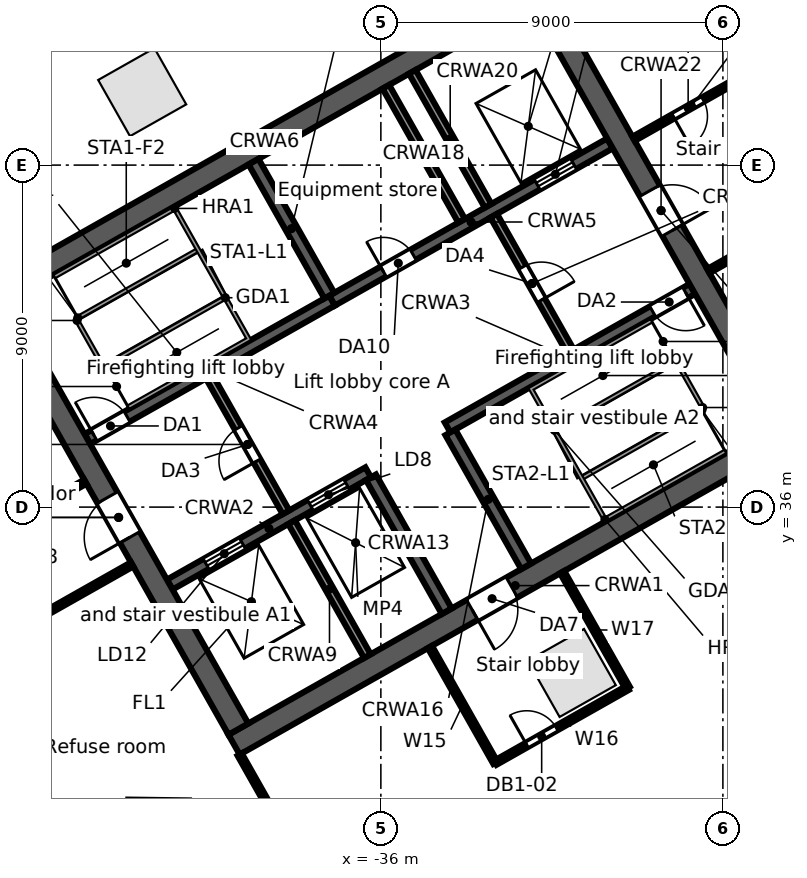
"""IFC4 building model, lengths in metres.
Left out: names, types, materials, properties, quantities, classifications, styles, units other than length and angle.
Written with IfcOpenShell. Run it as: python <this file> out.ifc"""

import sys

from ifc_helpers import new_model, si_unit, direction, frame, frame_2d, origin, origin_2d, place, context, subcontext, project, spatial, rectangle, extrude, element, fill, save


model = new_model("IFC4")
c1 = context("Model", 3, precision=1e-05, world=origin(), true_north=direction((0.0, 1.0)))
c2 = subcontext(c1, "Body", "Model", "MODEL_VIEW")
j1 = project(units=[si_unit("LENGTHUNIT", "METRE"), si_unit("PLANEANGLEUNIT", "RADIAN")], contexts=[c1])
p1 = place(None, origin())
s1 = spatial("IfcSite", under=j1, at=p1, CompositionType="ELEMENT")
p2 = place(p1, origin())
s2 = spatial("IfcBuilding", under=s1, at=p2, CompositionType="ELEMENT")
p3 = place(p2, frame((0.0, 0.0, -4.8)))
s3 = spatial("IfcBuildingStorey", under=s2, at=p3, CompositionType="ELEMENT", Elevation=-4.8)
p4 = place(p3, frame((-5.971, 78.503, 0.0), z_axis=(0.0, 0.0, 1.0), x_axis=(-0.870356741611, -0.492421711882, 0.0)))
e1 = element("IfcWall", 1, at=p4, inside=s3, PredefinedType="SOLIDWALL", context=c2, shape_type="SweptSolid", body=[
    extrude(rectangle(XDim=70.604, YDim=0.8, at=frame_2d((35.302, 0.0))), origin(), (0.0, 0.0, 1.0), 4.8),
])
p5 = place(p3, frame((-35.211, 18.197, 0.0), z_axis=(0.0, 0.0, 1.0), x_axis=(0.870356230452, 0.492422615355, 0.0)))
e2 = element("IfcWall", 2, at=p5, inside=s3, PredefinedType="SOLIDWALL", context=c2, shape_type="SweptSolid", body=[
    extrude(rectangle(XDim=41.941, YDim=0.8, at=frame_2d((20.97, 0.0))), origin(), (0.0, 0.0, 1.0), 4.8),
])
for number, where, z_axis, x_axis in (
    (3, (-42.28, 46.919, 0.0), (0.0, 0.0, 1.0), (-0.87, -0.492, 0.0)),
    (4, (-30.976, 31.635, 0.0), (0.0, 0.0, 1.0), (0.87, 0.492, 0.0)),
):
    element("IfcColumn", number, at=place(p3, frame(where, z_axis=z_axis, x_axis=x_axis)), inside=s3, PredefinedType="COLUMN", context=c2, shape_type="SweptSolid", body=[
        extrude(rectangle(XDim=1.7, YDim=1.7, at=origin_2d()), origin(), (0.0, 0.0, 1.0), 4.8),
    ])
p6 = place(p3, frame((-39.862, 29.749, 0.0), z_axis=(0.0, 0.0, 1.0), x_axis=(0.870350116061, 0.492433422375, 0.0)))
e5 = element("IfcWall", 5, at=p6, inside=s3, PredefinedType="SOLIDWALL", context=c2, shape_type="SweptSolid", body=[
    extrude(rectangle(XDim=17.0, YDim=0.6, at=frame_2d((8.5, 0.0))), origin(), (0.0, 0.0, 1.0), 4.35),
])
p7 = place(p6, frame((7.2, 0.0, 0.0)))
e6 = element("IfcOpeningElement", 6, at=p7, cuts=e5, PredefinedType="OPENING", context=c2, shape_type="SweptSolid", body=[
    extrude(rectangle(XDim=1.2, YDim=2.1, at=frame_2d((0.6, 1.05))), frame((0.0, 0.31, 0.0), z_axis=(0.0, -1.0, 0.0), x_axis=(1.0, 0.0, 0.0)), (0.0, 0.0, 1.0), 0.62),
])
p8 = place(p3, frame((-41.556, 33.961, 0.0), z_axis=(0.0, 0.0, 1.0), x_axis=(0.870343731308, 0.492444706919, 0.0)))
e7 = element("IfcWall", 7, at=p8, inside=s3, PredefinedType="SOLIDWALL", context=c2, shape_type="SweptSolid", body=[
    extrude(rectangle(XDim=6.0, YDim=0.3, at=frame_2d((3.0, 0.0))), origin(), (0.0, 0.0, 1.0), 4.35),
])
p9 = place(p8, frame((1.1, 0.0, 0.0)))
e8 = element("IfcOpeningElement", 8, at=p9, cuts=e7, PredefinedType="OPENING", context=c2, shape_type="SweptSolid", body=[
    extrude(rectangle(XDim=1.1, YDim=2.1, at=frame_2d((0.55, 1.05))), frame((0.0, 0.16, 0.0), z_axis=(0.0, -1.0, 0.0), x_axis=(1.0, 0.0, 0.0)), (0.0, 0.0, 1.0), 0.32),
])
p10 = place(p8, frame((4.25, 0.0, 0.0)))
e9 = element("IfcOpeningElement", 9, at=p10, cuts=e7, PredefinedType="OPENING", context=c2, shape_type="SweptSolid", body=[
    extrude(rectangle(XDim=1.1, YDim=2.1, at=frame_2d((0.55, 1.05))), frame((0.0, 0.16, 0.0), z_axis=(0.0, -1.0, 0.0), x_axis=(1.0, 0.0, 0.0)), (0.0, 0.0, 1.0), 0.32),
])
p11 = place(p3, frame((-34.245, 38.097, 0.0), z_axis=(0.0, 0.0, 1.0), x_axis=(0.870364910201, 0.492407273597, 0.0)))
e10 = element("IfcWall", 10, at=p11, inside=s3, PredefinedType="SOLIDWALL", context=c2, shape_type="SweptSolid", body=[
    extrude(rectangle(XDim=7.4, YDim=0.3, at=frame_2d((3.7, 0.0))), origin(), (0.0, 0.0, 1.0), 4.35),
])
p12 = place(p11, frame((6.2, 0.0, 0.0)))
e11 = element("IfcOpeningElement", 11, at=p12, cuts=e10, PredefinedType="OPENING", context=c2, shape_type="SweptSolid", body=[
    extrude(rectangle(XDim=1.0, YDim=2.1, at=frame_2d((0.5, 1.05))), frame((0.0, 0.16, 0.0), z_axis=(0.0, -1.0, 0.0), x_axis=(1.0, 0.0, 0.0)), (0.0, 0.0, 1.0), 0.32),
])
p13 = place(p3, frame((-43.723, 37.791, 0.0), z_axis=(0.0, 0.0, 1.0), x_axis=(0.87035077051, 0.49243226567, 0.0)))
e12 = element("IfcWall", 12, at=p13, inside=s3, PredefinedType="SOLIDWALL", context=c2, shape_type="SweptSolid", body=[
    extrude(rectangle(XDim=7.4, YDim=0.3, at=frame_2d((3.7, 0.0))), origin(), (0.0, 0.0, 1.0), 4.35),
])
p14 = place(p13, frame((0.2, 0.0, 0.0)))
e13 = element("IfcOpeningElement", 13, at=p14, cuts=e12, PredefinedType="OPENING", context=c2, shape_type="SweptSolid", body=[
    extrude(rectangle(XDim=1.0, YDim=2.1, at=frame_2d((0.5, 1.05))), frame((0.0, 0.16, 0.0), z_axis=(0.0, -1.0, 0.0), x_axis=(1.0, 0.0, 0.0)), (0.0, 0.0, 1.0), 0.32),
])
p15 = place(p3, frame((-37.282, 41.435, 0.0), z_axis=(0.0, 0.0, 1.0), x_axis=(0.870356516133, 0.492422110414, 0.0)))
e14 = element("IfcWall", 14, at=p15, inside=s3, PredefinedType="SOLIDWALL", context=c2, shape_type="SweptSolid", body=[
    extrude(rectangle(XDim=8.4, YDim=0.3, at=frame_2d((4.2, 0.0))), origin(), (0.0, 0.0, 1.0), 4.35),
])
p16 = place(p15, frame((6.2, 0.0, 0.0)))
e15 = element("IfcOpeningElement", 15, at=p16, cuts=e14, PredefinedType="OPENING", context=c2, shape_type="SweptSolid", body=[
    extrude(rectangle(XDim=1.1, YDim=2.1, at=frame_2d((0.55, 1.05))), frame((0.0, 0.16, 0.0), z_axis=(0.0, -1.0, 0.0), x_axis=(1.0, 0.0, 0.0)), (0.0, 0.0, 1.0), 0.32),
])
p17 = place(p15, frame((1.55, 0.0, 0.0)))
e16 = element("IfcOpeningElement", 16, at=p17, cuts=e14, PredefinedType="OPENING", context=c2, shape_type="SweptSolid", body=[
    extrude(rectangle(XDim=0.9, YDim=2.1, at=frame_2d((0.45, 1.05))), frame((0.0, 0.16, 0.0), z_axis=(0.0, -1.0, 0.0), x_axis=(1.0, 0.0, 0.0)), (0.0, 0.0, 1.0), 0.32),
])
p18 = place(p3, frame((-46.461, 41.412, 0.0), z_axis=(0.0, 0.0, 1.0), x_axis=(0.870350116061, 0.492433422375, 0.0)))
e17 = element("IfcWall", 17, at=p18, inside=s3, PredefinedType="SOLIDWALL", context=c2, shape_type="SweptSolid", body=[
    extrude(rectangle(XDim=17.0, YDim=0.6, at=frame_2d((8.5, 0.0))), origin(), (0.0, 0.0, 1.0), 4.35),
])
p19 = place(p3, frame((-46.052, 41.298, 0.0), z_axis=(0.0, 0.0, 1.0), x_axis=(0.492418598281, -0.870358503186, 0.0)))
e18 = element("IfcWall", 18, at=p19, inside=s3, PredefinedType="SOLIDWALL", context=c2, shape_type="SweptSolid", body=[
    extrude(rectangle(XDim=12.8, YDim=0.6, at=frame_2d((6.4, 0.0))), origin(), (0.0, 0.0, 1.0), 4.35),
])
p20 = place(p19, frame((5.8, 0.0, 0.0)))
e19 = element("IfcOpeningElement", 19, at=p20, cuts=e18, PredefinedType="OPENING", context=c2, shape_type="SweptSolid", body=[
    extrude(rectangle(XDim=1.2, YDim=2.1, at=frame_2d((0.6, 1.05))), frame((0.0, 0.31, 0.0), z_axis=(0.0, -1.0, 0.0), x_axis=(1.0, 0.0, 0.0)), (0.0, 0.0, 1.0), 0.62),
])
p21 = place(p3, frame((-38.349, 35.603, 0.0), z_axis=(0.0, 0.0, 1.0), x_axis=(0.49241474071, -0.870360685654, 0.0)))
e20 = element("IfcWall", 20, at=p21, inside=s3, PredefinedType="SOLIDWALL", context=c2, shape_type="SweptSolid", body=[
    extrude(rectangle(XDim=4.05, YDim=0.2, at=frame_2d((2.025, 0.0))), origin(), (0.0, 0.0, 1.0), 4.35),
])
p22 = place(p3, frame((-40.516, 39.433, 0.0), z_axis=(0.0, 0.0, 1.0), x_axis=(0.492453559952, -0.87033872216, 0.0)))
e21 = element("IfcWall", 21, at=p22, inside=s3, PredefinedType="PARTITIONING", context=c2, shape_type="SweptSolid", body=[
    extrude(rectangle(XDim=4.1, YDim=0.2, at=frame_2d((2.05, 0.0))), origin(), (0.0, 0.0, 1.0), 4.35),
])
p23 = place(p22, frame((1.55, 0.0, 0.0)))
e22 = element("IfcOpeningElement", 22, at=p23, cuts=e21, PredefinedType="OPENING", context=c2, shape_type="SweptSolid", body=[
    extrude(rectangle(XDim=1.0, YDim=2.1, at=frame_2d((0.5, 1.05))), frame((0.0, 0.11, 0.0), z_axis=(0.0, -1.0, 0.0), x_axis=(1.0, 0.0, 0.0)), (0.0, 0.0, 1.0), 0.22),
])
p24 = place(p3, frame((-36.26, 36.785, 0.0), z_axis=(0.0, 0.0, 1.0), x_axis=(0.492440575896, -0.870346068648, 0.0)))
e23 = element("IfcWall", 23, at=p24, inside=s3, PredefinedType="SOLIDWALL", context=c2, shape_type="SweptSolid", body=[
    extrude(rectangle(XDim=4.05, YDim=0.3, at=frame_2d((2.025, 0.0))), origin(), (0.0, 0.0, 1.0), 4.35),
])
p25 = place(p3, frame((-39.35, 45.09, 0.0), z_axis=(0.0, 0.0, 1.0), x_axis=(0.49241474071, -0.870360685654, 0.0)))
e24 = element("IfcWall", 24, at=p25, inside=s3, PredefinedType="SOLIDWALL", context=c2, shape_type="SweptSolid", body=[
    extrude(rectangle(XDim=4.05, YDim=0.3, at=frame_2d((2.025, 0.0))), origin(), (0.0, 0.0, 1.0), 4.35),
])
p26 = place(p3, frame((-34.171, 37.967, 0.0), z_axis=(0.0, 0.0, 1.0), x_axis=(0.492394910396, -0.870371904542, 0.0)))
e25 = element("IfcWall", 25, at=p26, inside=s3, PredefinedType="SOLIDWALL", context=c2, shape_type="SweptSolid", body=[
    extrude(rectangle(XDim=4.05, YDim=0.3, at=frame_2d((2.025, 0.0))), origin(), (0.0, 0.0, 1.0), 4.35),
])
p27 = place(p3, frame((-35.869, 47.06, 0.0), z_axis=(0.0, 0.0, 1.0), x_axis=(0.49241474071, -0.870360685654, 0.0)))
e26 = element("IfcWall", 26, at=p27, inside=s3, PredefinedType="SOLIDWALL", context=c2, shape_type="SweptSolid", body=[
    extrude(rectangle(XDim=4.05, YDim=0.2, at=frame_2d((2.025, 0.0))), origin(), (0.0, 0.0, 1.0), 4.35),
])
p28 = place(p3, frame((-33.031, 43.667, 0.0), z_axis=(0.0, 0.0, 1.0), x_axis=(0.492408451753, -0.87036424366, 0.0)))
e27 = element("IfcWall", 27, at=p28, inside=s3, PredefinedType="PARTITIONING", context=c2, shape_type="SweptSolid", body=[
    extrude(rectangle(XDim=4.1, YDim=0.2, at=frame_2d((2.05, 0.0))), origin(), (0.0, 0.0, 1.0), 4.35),
])
p29 = place(p28, frame((1.55, 0.0, 0.0)))
e28 = element("IfcOpeningElement", 28, at=p29, cuts=e27, PredefinedType="OPENING", context=c2, shape_type="SweptSolid", body=[
    extrude(rectangle(XDim=1.0, YDim=2.1, at=frame_2d((0.5, 1.05))), frame((0.0, 0.11, 0.0), z_axis=(0.0, -1.0, 0.0), x_axis=(1.0, 0.0, 0.0)), (0.0, 0.0, 1.0), 0.22),
])
p30 = place(p3, frame((-35.173, 47.454, 0.0), z_axis=(0.0, 0.0, 1.0), x_axis=(0.492440575896, -0.870346068648, 0.0)))
e29 = element("IfcWall", 29, at=p30, inside=s3, PredefinedType="SOLIDWALL", context=c2, shape_type="SweptSolid", body=[
    extrude(rectangle(XDim=4.05, YDim=0.2, at=frame_2d((2.025, 0.0))), origin(), (0.0, 0.0, 1.0), 4.35),
])
p31 = place(p3, frame((-31.778, 49.374, 0.0), z_axis=(0.0, 0.0, 1.0), x_axis=(0.492433046652, -0.870350328641, 0.0)))
e30 = element("IfcWall", 30, at=p31, inside=s3, PredefinedType="SOLIDWALL", context=c2, shape_type="SweptSolid", body=[
    extrude(rectangle(XDim=12.8, YDim=0.6, at=frame_2d((6.4, 0.0))), origin(), (0.0, 0.0, 1.0), 4.35),
])
p32 = place(p31, frame((5.8, 0.0, 0.0)))
e31 = element("IfcOpeningElement", 31, at=p32, cuts=e30, PredefinedType="OPENING", context=c2, shape_type="SweptSolid", body=[
    extrude(rectangle(XDim=1.2, YDim=2.1, at=frame_2d((0.6, 1.05))), frame((0.0, 0.31, 0.0), z_axis=(0.0, -1.0, 0.0), x_axis=(1.0, 0.0, 0.0)), (0.0, 0.0, 1.0), 0.62),
])
p33 = place(p3, frame((-48.999, 33.714, 0.0), z_axis=(0.0, 0.0, 1.0), x_axis=(0.870396049796, 0.492352228084, 0.0)))
e32 = element("IfcWall", 32, at=p33, inside=s3, PredefinedType="PARTITIONING", context=c2, shape_type="SweptSolid", body=[
    extrude(rectangle(XDim=6.0, YDim=0.125, at=frame_2d((3.0, 0.0))), origin(), (0.0, 0.0, 1.0), 4.35),
])
p34 = place(p33, frame((2.45, 0.0, 0.0)))
e33 = element("IfcOpeningElement", 33, at=p34, cuts=e32, PredefinedType="OPENING", context=c2, shape_type="SweptSolid", body=[
    extrude(rectangle(XDim=0.9, YDim=2.1, at=frame_2d((0.45, 1.05))), frame((0.0, 0.073, 0.0), z_axis=(0.0, -1.0, 0.0), x_axis=(1.0, 0.0, 0.0)), (0.0, 0.0, 1.0), 0.145),
])
p35 = place(p3, frame((-47.768, 31.538, 0.0), z_axis=(0.0, 0.0, 1.0), x_axis=(0.870405913844, 0.492334789696, 0.0)))
e34 = element("IfcWall", 34, at=p35, inside=s3, PredefinedType="PARTITIONING", context=c2, shape_type="SweptSolid", body=[
    extrude(rectangle(XDim=6.0, YDim=0.125, at=frame_2d((3.0, 0.0))), origin(), (0.0, 0.0, 1.0), 4.35),
])
p36 = place(p35, frame((2.45, 0.0, 0.0)))
e35 = element("IfcOpeningElement", 35, at=p36, cuts=e34, PredefinedType="OPENING", context=c2, shape_type="SweptSolid", body=[
    extrude(rectangle(XDim=0.9, YDim=2.1, at=frame_2d((0.45, 1.05))), frame((0.0, 0.073, 0.0), z_axis=(0.0, -1.0, 0.0), x_axis=(1.0, 0.0, 0.0)), (0.0, 0.0, 1.0), 0.145),
])
p37 = place(p3, frame((-39.715, 29.488, 0.0), z_axis=(0.0, 0.0, 1.0), x_axis=(0.492486226821, -0.870320237839, 0.0)))
e36 = element("IfcWall", 36, at=p37, inside=s3, PredefinedType="PARTITIONING", context=c2, shape_type="SweptSolid", body=[
    extrude(rectangle(XDim=9.75, YDim=0.125, at=frame_2d((4.875, 0.0))), origin(), (0.0, 0.0, 1.0), 3.522),
])
p38 = place(p3, frame((-34.71, 32.319, 0.0), z_axis=(0.0, 0.0, 1.0), x_axis=(0.492310098002, -0.870419879946, 0.0)))
e37 = element("IfcWall", 37, at=p38, inside=s3, PredefinedType="PARTITIONING", context=c2, shape_type="SweptSolid", body=[
    extrude(rectangle(XDim=3.5, YDim=0.125, at=frame_2d((1.75, 0.0))), origin(), (0.0, 0.0, 1.0), 3.522),
])
p39 = place(p3, frame((-32.987, 29.273, 0.0), z_axis=(0.0, 0.0, 1.0), x_axis=(0.87037183571, 0.492395032065, 0.0)))
e38 = element("IfcWall", 38, at=p39, inside=s3, PredefinedType="PARTITIONING", context=c2, shape_type="SweptSolid", body=[
    extrude(rectangle(XDim=4.001, YDim=0.125, at=frame_2d((2.0, 0.0))), origin(), (0.0, 0.0, 1.0), 3.724),
])
p40 = place(p39, frame((0.95, 0.0, 0.0)))
e39 = element("IfcOpeningElement", 39, at=p40, cuts=e38, PredefinedType="OPENING", context=c2, shape_type="SweptSolid", body=[
    extrude(rectangle(XDim=0.9, YDim=2.1, at=frame_2d((0.45, 1.05))), frame((0.0, 0.073, 0.0), z_axis=(0.0, -1.0, 0.0), x_axis=(1.0, 0.0, 0.0)), (0.0, 0.0, 1.0), 0.145),
])
p41 = place(p3, frame((-31.229, 34.289, 0.0), z_axis=(0.0, 0.0, 1.0), x_axis=(0.492574298942, -0.870270394775, 0.0)))
e40 = element("IfcWall", 40, at=p41, inside=s3, PredefinedType="PARTITIONING", context=c2, shape_type="SweptSolid", body=[
    extrude(rectangle(XDim=3.5, YDim=0.125, at=frame_2d((1.75, 0.0))), origin(), (0.0, 0.0, 1.0), 3.63),
])
p42 = place(p3, frame((-29.35, 45.692, 0.0), z_axis=(0.0, 0.0, 1.0), x_axis=(0.870270394775, 0.492574298942, 0.0)))
e41 = element("IfcWall", 41, at=p42, inside=s3, PredefinedType="PARTITIONING", context=c2, shape_type="SweptSolid", body=[
    extrude(rectangle(XDim=3.5, YDim=0.125, at=frame_2d((1.75, 0.0))), origin(), (0.0, 0.0, 1.0), 4.35),
])
p43 = place(p42, frame((1.2, 0.0, 0.0)))
e42 = element("IfcOpeningElement", 42, at=p43, cuts=e41, PredefinedType="OPENING", context=c2, shape_type="SweptSolid", body=[
    extrude(rectangle(XDim=0.9, YDim=2.1, at=frame_2d((0.45, 1.05))), frame((0.0, 0.073, 0.0), z_axis=(0.0, -1.0, 0.0), x_axis=(1.0, 0.0, 0.0)), (0.0, 0.0, 1.0), 0.145),
])
p44 = place(p3, frame((-27.381, 42.211, 0.0), z_axis=(0.0, 0.0, 1.0), x_axis=(0.870457605386, 0.492243392262, 0.0)))
e43 = element("IfcWall", 43, at=p44, inside=s3, PredefinedType="PARTITIONING", context=c2, shape_type="SweptSolid", body=[
    extrude(rectangle(XDim=3.5, YDim=0.125, at=frame_2d((1.75, 0.0))), origin(), (0.0, 0.0, 1.0), 3.43),
])
p45 = place(p16, origin())
e44 = element("IfcDoor", 44, at=p45, inside=s3, OperationType="DOUBLE_DOOR_SLIDING", PredefinedType="DOOR", context=c2, shape_type="SweptSolid", body=[
    extrude(rectangle(XDim=1.1, YDim=2.1, at=frame_2d((0.55, 1.05))), frame((0.0, 0.025, 0.0), z_axis=(0.0, -1.0, 0.0), x_axis=(1.0, 0.0, 0.0)), (0.0, 0.0, 1.0), 0.05),
])
fill(e15, e44)
p46 = place(p9, origin())
e45 = element("IfcDoor", 45, at=p46, inside=s3, OperationType="DOUBLE_DOOR_SLIDING", PredefinedType="DOOR", context=c2, shape_type="SweptSolid", body=[
    extrude(rectangle(XDim=1.1, YDim=2.1, at=frame_2d((0.55, 1.05))), frame((0.0, 0.025, 0.0), z_axis=(0.0, -1.0, 0.0), x_axis=(1.0, 0.0, 0.0)), (0.0, 0.0, 1.0), 0.05),
])
fill(e8, e45)
p47 = place(p10, origin())
e46 = element("IfcDoor", 46, at=p47, inside=s3, OperationType="DOUBLE_DOOR_SLIDING", PredefinedType="DOOR", context=c2, shape_type="SweptSolid", body=[
    extrude(rectangle(XDim=1.1, YDim=2.1, at=frame_2d((0.55, 1.05))), frame((0.0, 0.025, 0.0), z_axis=(0.0, -1.0, 0.0), x_axis=(1.0, 0.0, 0.0)), (0.0, 0.0, 1.0), 0.05),
])
fill(e9, e46)
p48 = place(p14, origin())
e47 = element("IfcDoor", 47, at=p48, inside=s3, OperationType="SINGLE_SWING_LEFT", PredefinedType="DOOR", context=c2, shape_type="SweptSolid", body=[
    extrude(rectangle(XDim=1.0, YDim=2.1, at=frame_2d((0.5, 1.05))), frame((0.0, 0.025, 0.0), z_axis=(0.0, -1.0, 0.0), x_axis=(1.0, 0.0, 0.0)), (0.0, 0.0, 1.0), 0.05),
])
fill(e13, e47)
p49 = place(p12, frame((1.0, 0.0, 0.0), z_axis=(0.0, 0.0, 1.0), x_axis=(-1.0, 0.0, 0.0)))
e48 = element("IfcDoor", 48, at=p49, inside=s3, OperationType="SINGLE_SWING_LEFT", PredefinedType="DOOR", context=c2, shape_type="SweptSolid", body=[
    extrude(rectangle(XDim=1.0, YDim=2.1, at=frame_2d((0.5, 1.05))), frame((0.0, 0.025, 0.0), z_axis=(0.0, -1.0, 0.0), x_axis=(1.0, 0.0, 0.0)), (0.0, 0.0, 1.0), 0.05),
])
fill(e11, e48)
p50 = place(p23, frame((1.0, 0.0, 0.0), z_axis=(0.0, 0.0, 1.0), x_axis=(-1.0, 0.0, 0.0)))
e49 = element("IfcDoor", 49, at=p50, inside=s3, OperationType="SINGLE_SWING_LEFT", PredefinedType="DOOR", context=c2, shape_type="SweptSolid", body=[
    extrude(rectangle(XDim=1.0, YDim=2.1, at=frame_2d((0.5, 1.05))), frame((0.0, 0.025, 0.0), z_axis=(0.0, -1.0, 0.0), x_axis=(1.0, 0.0, 0.0)), (0.0, 0.0, 1.0), 0.05),
])
fill(e22, e49)
p51 = place(p20, frame((1.2, 0.0, 0.0), z_axis=(0.0, 0.0, 1.0), x_axis=(-1.0, 0.0, 0.0)))
e50 = element("IfcDoor", 50, at=p51, inside=s3, OperationType="SINGLE_SWING_LEFT", PredefinedType="DOOR", context=c2, shape_type="SweptSolid", body=[
    extrude(rectangle(XDim=1.2, YDim=2.1, at=frame_2d((0.6, 1.05))), frame((0.0, 0.025, 0.0), z_axis=(0.0, -1.0, 0.0), x_axis=(1.0, 0.0, 0.0)), (0.0, 0.0, 1.0), 0.05),
])
fill(e19, e50)
p52 = place(p29, origin())
e51 = element("IfcDoor", 51, at=p52, inside=s3, OperationType="SINGLE_SWING_RIGHT", PredefinedType="DOOR", context=c2, shape_type="SweptSolid", body=[
    extrude(rectangle(XDim=1.0, YDim=2.1, at=frame_2d((0.5, 1.05))), frame((0.0, 0.025, 0.0), z_axis=(0.0, -1.0, 0.0), x_axis=(1.0, 0.0, 0.0)), (0.0, 0.0, 1.0), 0.05),
])
fill(e28, e51)
p53 = place(p32, origin())
e52 = element("IfcDoor", 52, at=p53, inside=s3, OperationType="SINGLE_SWING_RIGHT", PredefinedType="DOOR", context=c2, shape_type="SweptSolid", body=[
    extrude(rectangle(XDim=1.2, YDim=2.1, at=frame_2d((0.6, 1.05))), frame((0.0, 0.025, 0.0), z_axis=(0.0, -1.0, 0.0), x_axis=(1.0, 0.0, 0.0)), (0.0, 0.0, 1.0), 0.05),
])
fill(e31, e52)
p54 = place(p7, frame((1.2, 0.0, 0.0), z_axis=(0.0, 0.0, 1.0), x_axis=(-1.0, 0.0, 0.0)))
e53 = element("IfcDoor", 53, at=p54, inside=s3, OperationType="SINGLE_SWING_RIGHT", PredefinedType="DOOR", context=c2, shape_type="SweptSolid", body=[
    extrude(rectangle(XDim=1.2, YDim=2.1, at=frame_2d((0.6, 1.05))), frame((0.0, 0.025, 0.0), z_axis=(0.0, -1.0, 0.0), x_axis=(1.0, 0.0, 0.0)), (0.0, 0.0, 1.0), 0.05),
])
fill(e6, e53)
p55 = place(p17, origin())
e54 = element("IfcDoor", 54, at=p55, inside=s3, OperationType="SINGLE_SWING_LEFT", PredefinedType="DOOR", context=c2, shape_type="SweptSolid", body=[
    extrude(rectangle(XDim=0.9, YDim=2.1, at=frame_2d((0.45, 1.05))), frame((0.0, 0.025, 0.0), z_axis=(0.0, -1.0, 0.0), x_axis=(1.0, 0.0, 0.0)), (0.0, 0.0, 1.0), 0.05),
])
fill(e16, e54)
p56 = place(p43, frame((0.9, 0.0, 0.0), z_axis=(0.0, 0.0, 1.0), x_axis=(-1.0, 0.0, 0.0)))
e55 = element("IfcDoor", 55, at=p56, inside=s3, OperationType="SINGLE_SWING_RIGHT", PredefinedType="DOOR", context=c2, shape_type="SweptSolid", body=[
    extrude(rectangle(XDim=0.9, YDim=2.1, at=frame_2d((0.45, 1.05))), frame((0.0, 0.025, 0.0), z_axis=(0.0, -1.0, 0.0), x_axis=(1.0, 0.0, 0.0)), (0.0, 0.0, 1.0), 0.05),
])
fill(e42, e55)
p57 = place(p40, origin())
e56 = element("IfcDoor", 56, at=p57, inside=s3, OperationType="SINGLE_SWING_LEFT", PredefinedType="DOOR", context=c2, shape_type="SweptSolid", body=[
    extrude(rectangle(XDim=0.9, YDim=2.1, at=frame_2d((0.45, 1.05))), frame((0.0, 0.025, 0.0), z_axis=(0.0, -1.0, 0.0), x_axis=(1.0, 0.0, 0.0)), (0.0, 0.0, 1.0), 0.05),
])
fill(e39, e56)
save(model, sys.argv[1])
